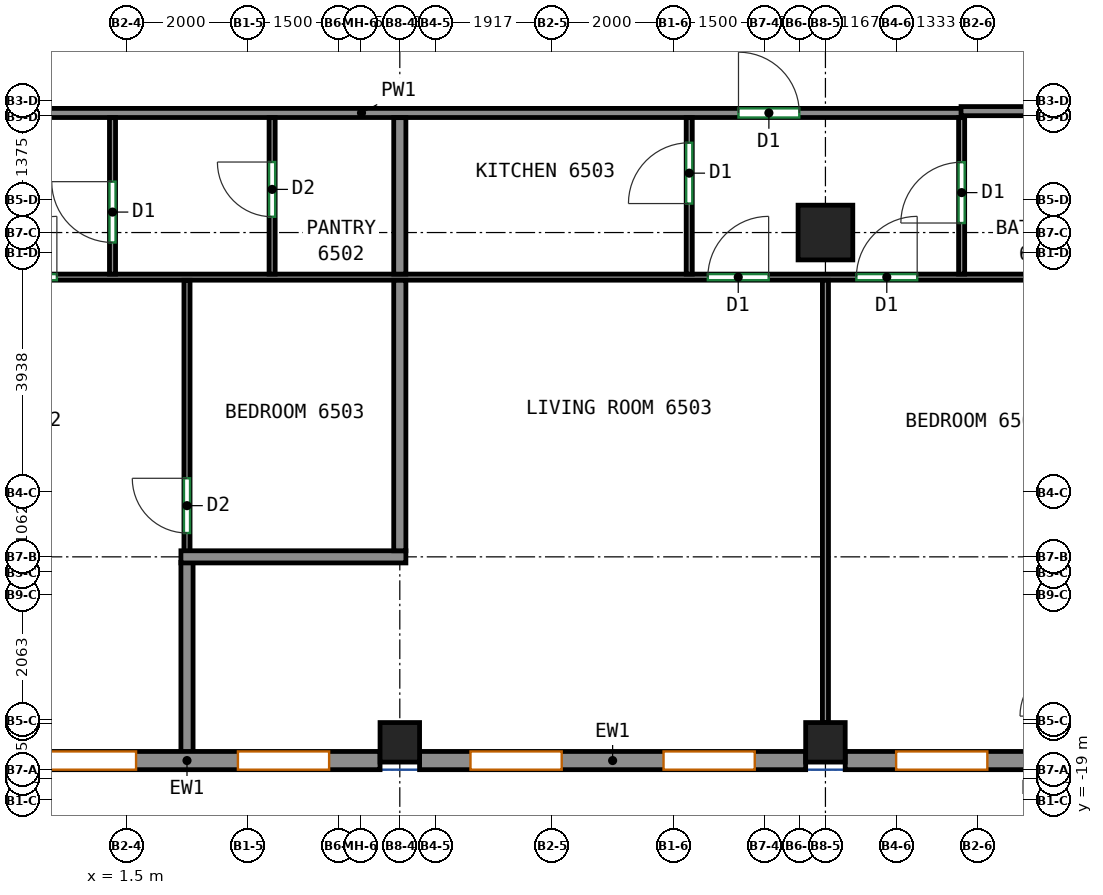
"""IFC4 building model, lengths in metres.
Left out: names, types, materials, properties, quantities, classifications, styles, units other than length and angle.
Written with IfcOpenShell. Run it as: python <this file> out.ifc"""

import sys

from ifc_helpers import new_model, si_unit, direction, frame, frame_2d, origin, origin_2d, place, context, subcontext, project, spatial, rectangle, extrude, source, transform, mapped, element, fill, save


model = new_model("IFC4")
c1 = context("Model", 3, precision=1e-05, world=origin(), true_north=direction((0.0, 1.0)))
c2 = subcontext(c1, "Body", "Model", "MODEL_VIEW")
j1 = project(units=[si_unit("LENGTHUNIT", "METRE"), si_unit("PLANEANGLEUNIT", "RADIAN")], contexts=[c1])
p1 = place(None, origin())
s1 = spatial("IfcSite", under=j1, at=p1, CompositionType="ELEMENT")
p2 = place(p1, origin())
s2 = spatial("IfcBuilding", under=s1, at=p2, CompositionType="ELEMENT")
p3 = place(p2, frame((0.0, 0.0, 267.0)))
s3 = spatial("IfcBuildingStorey", under=s2, at=p3, CompositionType="ELEMENT", Elevation=267.0)
m1 = source(origin(), c2, "Body", "SweptSolid", [
    extrude(rectangle(XDim=0.65, YDim=0.65, at=origin_2d()), origin(), (0.0, 0.0, 1.0), 3.12),
])
for number, where, z_axis, x_axis in (
    (1, (6.0, -18.05, 0.0), (0.0, 0.0, 1.0), (1.0, 0.0, 0.0)),
    (2, (13.0, -18.05, 0.0), (0.0, 0.0, 1.0), (1.0, 0.0, 0.0)),
):
    element("IfcColumn", number, at=place(p3, frame(where, z_axis=z_axis, x_axis=x_axis)), inside=s3, PredefinedType="COLUMN", context=c2, shape_type="MappedRepresentation", body=[
        mapped(m1, transform((0.0, 0.0, 0.0))),
    ])
m2 = source(origin(), c2, "Body", "SweptSolid", [
    extrude(rectangle(XDim=0.9, YDim=0.9, at=origin_2d()), origin(), (0.0, 0.0, 1.0), 3.12),
])
p4 = place(p3, frame((13.0, -9.667, 0.0), z_axis=(0.0, 0.0, 1.0), x_axis=(1.0, 0.0, 0.0)))
e3 = element("IfcColumn", 3, at=p4, inside=s3, PredefinedType="COLUMN", context=c2, shape_type="MappedRepresentation", body=[
    mapped(m2, transform((0.0, 0.0, 0.0))),
])
m3 = source(origin(), c2, "Body", "SweptSolid", [
    extrude(rectangle(XDim=6.35, YDim=0.3, at=frame_2d((3.175, 0.0))), origin(), (0.0, 0.0, 1.0), 3.12),
])
p5 = place(p3, frame((-0.675, -18.35, 0.0), z_axis=(0.0, 0.0, 1.0), x_axis=(1.0, 0.0, 0.0)))
e4 = element("IfcWall", 4, at=p5, inside=s3, PredefinedType="SOLIDWALL", context=c2, shape_type="MappedRepresentation", body=[
    mapped(m3, transform((0.0, 0.0, 0.0))),
])
p6 = place(p5, frame((0.837, 0.0, 0.8)))
e5 = element("IfcOpeningElement", 5, at=p6, cuts=e4, PredefinedType="OPENING", context=c2, shape_type="SweptSolid", body=[
    extrude(rectangle(XDim=1.5, YDim=2.05, at=frame_2d((0.75, 1.025))), frame((0.0, 0.16, 0.0), z_axis=(0.0, -1.0, 0.0), x_axis=(1.0, 0.0, 0.0)), (0.0, 0.0, 1.0), 0.32),
])
p7 = place(p5, frame((4.012, 0.0, 0.8)))
e6 = element("IfcOpeningElement", 6, at=p7, cuts=e4, PredefinedType="OPENING", context=c2, shape_type="SweptSolid", body=[
    extrude(rectangle(XDim=1.5, YDim=2.05, at=frame_2d((0.75, 1.025))), frame((0.0, 0.16, 0.0), z_axis=(0.0, -1.0, 0.0), x_axis=(1.0, 0.0, 0.0)), (0.0, 0.0, 1.0), 0.32),
])
p8 = place(p3, frame((6.325, -18.35, 0.0), z_axis=(0.0, 0.0, 1.0), x_axis=(1.0, 0.0, 0.0)))
e7 = element("IfcWall", 7, at=p8, inside=s3, PredefinedType="SOLIDWALL", context=c2, shape_type="MappedRepresentation", body=[
    mapped(m3, transform((0.0, 0.0, 0.0))),
])
p9 = place(p8, frame((0.837, 0.0, 0.8)))
e8 = element("IfcOpeningElement", 8, at=p9, cuts=e7, PredefinedType="OPENING", context=c2, shape_type="SweptSolid", body=[
    extrude(rectangle(XDim=1.5, YDim=2.05, at=frame_2d((0.75, 1.025))), frame((0.0, 0.16, 0.0), z_axis=(0.0, -1.0, 0.0), x_axis=(1.0, 0.0, 0.0)), (0.0, 0.0, 1.0), 0.32),
])
p10 = place(p8, frame((4.012, 0.0, 0.8)))
e9 = element("IfcOpeningElement", 9, at=p10, cuts=e7, PredefinedType="OPENING", context=c2, shape_type="SweptSolid", body=[
    extrude(rectangle(XDim=1.5, YDim=2.05, at=frame_2d((0.75, 1.025))), frame((0.0, 0.16, 0.0), z_axis=(0.0, -1.0, 0.0), x_axis=(1.0, 0.0, 0.0)), (0.0, 0.0, 1.0), 0.32),
])
p11 = place(p3, frame((13.325, -18.35, 0.0), z_axis=(0.0, 0.0, 1.0), x_axis=(1.0, 0.0, 0.0)))
e10 = element("IfcWall", 10, at=p11, inside=s3, PredefinedType="SOLIDWALL", context=c2, shape_type="MappedRepresentation", body=[
    mapped(m3, transform((0.0, 0.0, 0.0))),
])
p12 = place(p11, frame((0.837, 0.0, 0.8)))
e11 = element("IfcOpeningElement", 11, at=p12, cuts=e10, PredefinedType="OPENING", context=c2, shape_type="SweptSolid", body=[
    extrude(rectangle(XDim=1.5, YDim=2.05, at=frame_2d((0.75, 1.025))), frame((0.0, 0.16, 0.0), z_axis=(0.0, -1.0, 0.0), x_axis=(1.0, 0.0, 0.0)), (0.0, 0.0, 1.0), 0.32),
])
p13 = place(p11, frame((4.012, 0.0, 0.8)))
e12 = element("IfcOpeningElement", 12, at=p13, cuts=e10, PredefinedType="OPENING", context=c2, shape_type="SweptSolid", body=[
    extrude(rectangle(XDim=1.5, YDim=2.05, at=frame_2d((0.75, 1.025))), frame((0.0, 0.16, 0.0), z_axis=(0.0, -1.0, 0.0), x_axis=(1.0, 0.0, 0.0)), (0.0, 0.0, 1.0), 0.32),
])
p14 = place(p3, frame((-4.51, -7.7, 0.0), z_axis=(0.0, 0.0, 1.0), x_axis=(1.0, 0.0, 0.0)))
e13 = element("IfcWall", 13, at=p14, inside=s3, PredefinedType="PARTITIONING", context=c2, shape_type="SweptSolid", body=[
    extrude(rectangle(XDim=19.76, YDim=0.15, at=frame_2d((9.88, 0.0))), origin(), (0.0, 0.0, 1.0), 3.12),
])
p15 = place(p14, frame((3.566, 0.0, 0.0)))
e14 = element("IfcOpeningElement", 14, at=p15, cuts=e13, PredefinedType="OPENING", context=c2, shape_type="SweptSolid", body=[
    extrude(rectangle(XDim=1.0, YDim=2.1, at=frame_2d((0.5, 1.05))), frame((0.0, 0.085, 0.0), z_axis=(0.0, -1.0, 0.0), x_axis=(1.0, 0.0, 0.0)), (0.0, 0.0, 1.0), 0.17),
])
p16 = place(p14, frame((16.08, 0.0, 0.0)))
e15 = element("IfcOpeningElement", 15, at=p16, cuts=e13, PredefinedType="OPENING", context=c2, shape_type="SweptSolid", body=[
    extrude(rectangle(XDim=1.0, YDim=2.1, at=frame_2d((0.5, 1.05))), frame((0.0, 0.085, 0.0), z_axis=(0.0, -1.0, 0.0), x_axis=(1.0, 0.0, 0.0)), (0.0, 0.0, 1.0), 0.17),
])
p17 = place(p3, frame((15.23, -7.67, 0.0), z_axis=(0.0, 0.0, 1.0), x_axis=(1.0, 0.0, 0.0)))
e16 = element("IfcWall", 16, at=p17, inside=s3, PredefinedType="PARTITIONING", context=c2, shape_type="SweptSolid", body=[
    extrude(rectangle(XDim=3.87, YDim=0.15, at=frame_2d((1.935, 0.0))), origin(), (0.0, 0.0, 1.0), 3.12),
])
p18 = place(p3, frame((-4.6, -10.4, 0.0), z_axis=(0.0, 0.0, 1.0), x_axis=(1.0, 0.0, 0.0)))
e17 = element("IfcWall", 17, at=p18, inside=s3, PredefinedType="PARTITIONING", context=c2, shape_type="SweptSolid", body=[
    extrude(rectangle(XDim=22.35, YDim=0.1, at=frame_2d((11.175, 0.0))), origin(), (0.0, 0.0, 1.0), 3.12),
])
p19 = place(p18, frame((3.96, 0.0, 0.0)))
e18 = element("IfcOpeningElement", 18, at=p19, cuts=e17, PredefinedType="OPENING", context=c2, shape_type="SweptSolid", body=[
    extrude(rectangle(XDim=1.0, YDim=2.1, at=frame_2d((0.5, 1.05))), frame((0.0, 0.06, 0.0), z_axis=(0.0, -1.0, 0.0), x_axis=(1.0, 0.0, 0.0)), (0.0, 0.0, 1.0), 0.12),
])
p20 = place(p18, frame((15.666, 0.0, 0.0)))
e19 = element("IfcOpeningElement", 19, at=p20, cuts=e17, PredefinedType="OPENING", context=c2, shape_type="SweptSolid", body=[
    extrude(rectangle(XDim=1.0, YDim=2.1, at=frame_2d((0.5, 1.05))), frame((0.0, 0.06, 0.0), z_axis=(0.0, -1.0, 0.0), x_axis=(1.0, 0.0, 0.0)), (0.0, 0.0, 1.0), 0.12),
])
p21 = place(p18, frame((18.109, 0.0, 0.0)))
e20 = element("IfcOpeningElement", 20, at=p21, cuts=e17, PredefinedType="OPENING", context=c2, shape_type="SweptSolid", body=[
    extrude(rectangle(XDim=1.0, YDim=2.1, at=frame_2d((0.5, 1.05))), frame((0.0, 0.06, 0.0), z_axis=(0.0, -1.0, 0.0), x_axis=(1.0, 0.0, 0.0)), (0.0, 0.0, 1.0), 0.12),
])
p22 = place(p3, frame((1.275, -10.35, 0.0), z_axis=(0.0, 0.0, 1.0), x_axis=(0.0, 1.0, 0.0)))
e21 = element("IfcWall", 21, at=p22, inside=s3, PredefinedType="PARTITIONING", context=c2, shape_type="SweptSolid", body=[
    extrude(rectangle(XDim=2.573, YDim=0.1, at=frame_2d((1.287, 0.0))), origin(), (0.0, 0.0, 1.0), 3.12),
])
p23 = place(p22, frame((0.52, 0.0, 0.0)))
e22 = element("IfcOpeningElement", 22, at=p23, cuts=e21, PredefinedType="OPENING", context=c2, shape_type="SweptSolid", body=[
    extrude(rectangle(XDim=1.0, YDim=2.1, at=frame_2d((0.5, 1.05))), frame((0.0, 0.06, 0.0), z_axis=(0.0, -1.0, 0.0), x_axis=(1.0, 0.0, 0.0)), (0.0, 0.0, 1.0), 0.12),
])
p24 = place(p3, frame((3.9, -10.35, 0.0), z_axis=(0.0, 0.0, 1.0), x_axis=(0.0, 1.0, 0.0)))
e23 = element("IfcWall", 23, at=p24, inside=s3, PredefinedType="PARTITIONING", context=c2, shape_type="SweptSolid", body=[
    extrude(rectangle(XDim=2.573, YDim=0.1, at=frame_2d((1.287, 0.0))), origin(), (0.0, 0.0, 1.0), 3.12),
])
p25 = place(p24, frame((0.943, 0.0, 0.0)))
e24 = element("IfcOpeningElement", 24, at=p25, cuts=e23, PredefinedType="OPENING", context=c2, shape_type="SweptSolid", body=[
    extrude(rectangle(XDim=0.9, YDim=2.1, at=frame_2d((0.45, 1.05))), frame((0.0, 0.06, 0.0), z_axis=(0.0, -1.0, 0.0), x_axis=(1.0, 0.0, 0.0)), (0.0, 0.0, 1.0), 0.12),
])
p26 = place(p3, frame((6.0, -10.35, 0.0), z_axis=(0.0, 0.0, 1.0), x_axis=(0.0, 1.0, 0.0)))
e25 = element("IfcWall", 25, at=p26, inside=s3, PredefinedType="PARTITIONING", context=c2, shape_type="SweptSolid", body=[
    extrude(rectangle(XDim=2.573, YDim=0.2, at=frame_2d((1.287, 0.0))), origin(), (0.0, 0.0, 1.0), 3.12),
])
p27 = place(p3, frame((2.5, -14.91, 0.0), z_axis=(0.0, 0.0, 1.0), x_axis=(0.0, 1.0, 0.0)))
e26 = element("IfcWall", 26, at=p27, inside=s3, PredefinedType="PARTITIONING", context=c2, shape_type="SweptSolid", body=[
    extrude(rectangle(XDim=4.458, YDim=0.1, at=frame_2d((2.229, 0.0))), origin(), (0.0, 0.0, 1.0), 3.12),
])
p28 = place(p27, frame((0.302, 0.0, 0.0)))
e27 = element("IfcOpeningElement", 27, at=p28, cuts=e26, PredefinedType="OPENING", context=c2, shape_type="SweptSolid", body=[
    extrude(rectangle(XDim=0.9, YDim=2.1, at=frame_2d((0.45, 1.05))), frame((0.0, 0.06, 0.0), z_axis=(0.0, -1.0, 0.0), x_axis=(1.0, 0.0, 0.0)), (0.0, 0.0, 1.0), 0.12),
])
p29 = place(p3, frame((2.5, -18.25, 0.0), z_axis=(0.0, 0.0, 1.0), x_axis=(0.0, 1.0, 0.0)))
e28 = element("IfcWall", 28, at=p29, inside=s3, PredefinedType="PARTITIONING", context=c2, shape_type="SweptSolid", body=[
    extrude(rectangle(XDim=3.16, YDim=0.2, at=frame_2d((1.58, 0.0))), origin(), (0.0, 0.0, 1.0), 3.12),
])
p30 = place(p3, frame((2.4, -15.0, 0.0), z_axis=(0.0, 0.0, 1.0), x_axis=(1.0, 0.0, 0.0)))
e29 = element("IfcWall", 29, at=p30, inside=s3, PredefinedType="PARTITIONING", context=c2, shape_type="SweptSolid", body=[
    extrude(rectangle(XDim=3.7, YDim=0.2, at=frame_2d((1.85, 0.0))), origin(), (0.0, 0.0, 1.0), 3.12),
])
p31 = place(p3, frame((6.0, -14.9, 0.0), z_axis=(0.0, 0.0, 1.0), x_axis=(0.0, 1.0, 0.0)))
e30 = element("IfcWall", 30, at=p31, inside=s3, PredefinedType="PARTITIONING", context=c2, shape_type="SweptSolid", body=[
    extrude(rectangle(XDim=4.448, YDim=0.2, at=frame_2d((2.224, 0.0))), origin(), (0.0, 0.0, 1.0), 3.12),
])
p32 = place(p3, frame((10.76, -10.35, 0.0), z_axis=(0.0, 0.0, 1.0), x_axis=(0.0, 1.0, 0.0)))
e31 = element("IfcWall", 31, at=p32, inside=s3, PredefinedType="PARTITIONING", context=c2, shape_type="SweptSolid", body=[
    extrude(rectangle(XDim=2.573, YDim=0.1, at=frame_2d((1.287, 0.0))), origin(), (0.0, 0.0, 1.0), 3.12),
])
p33 = place(p32, frame((1.16, 0.0, 0.0)))
e32 = element("IfcOpeningElement", 32, at=p33, cuts=e31, PredefinedType="OPENING", context=c2, shape_type="SweptSolid", body=[
    extrude(rectangle(XDim=1.0, YDim=2.1, at=frame_2d((0.5, 1.05))), frame((0.0, 0.06, 0.0), z_axis=(0.0, -1.0, 0.0), x_axis=(1.0, 0.0, 0.0)), (0.0, 0.0, 1.0), 0.12),
])
p34 = place(p3, frame((15.24, -10.35, 0.0), z_axis=(0.0, 0.0, 1.0), x_axis=(0.0, 1.0, 0.0)))
e33 = element("IfcWall", 33, at=p34, inside=s3, PredefinedType="PARTITIONING", context=c2, shape_type="SweptSolid", body=[
    extrude(rectangle(XDim=2.573, YDim=0.1, at=frame_2d((1.287, 0.0))), origin(), (0.0, 0.0, 1.0), 3.12),
])
p35 = place(p34, frame((0.84, 0.0, 0.0)))
e34 = element("IfcOpeningElement", 34, at=p35, cuts=e33, PredefinedType="OPENING", context=c2, shape_type="SweptSolid", body=[
    extrude(rectangle(XDim=1.0, YDim=2.1, at=frame_2d((0.5, 1.05))), frame((0.0, 0.06, 0.0), z_axis=(0.0, -1.0, 0.0), x_axis=(1.0, 0.0, 0.0)), (0.0, 0.0, 1.0), 0.12),
])
p36 = place(p3, frame((13.0, -17.725, 0.0), z_axis=(0.0, 0.0, 1.0), x_axis=(0.0, 1.0, 0.0)))
e35 = element("IfcWall", 35, at=p36, inside=s3, PredefinedType="PARTITIONING", context=c2, shape_type="SweptSolid", body=[
    extrude(rectangle(XDim=7.273, YDim=0.1, at=frame_2d((3.637, 0.0))), origin(), (0.0, 0.0, 1.0), 3.12),
])
p37 = place(p6, origin())
e36 = element("IfcWindow", 36, at=p37, inside=s3, PartitioningType="SINGLE_PANEL", PredefinedType="WINDOW", context=c2, shape_type="SweptSolid", body=[
    extrude(rectangle(XDim=1.5, YDim=2.05, at=frame_2d((0.75, 1.025))), frame((0.0, 0.03, 0.0), z_axis=(0.0, -1.0, 0.0), x_axis=(1.0, 0.0, 0.0)), (0.0, 0.0, 1.0), 0.06),
])
fill(e5, e36)
p38 = place(p7, origin())
e37 = element("IfcWindow", 37, at=p38, inside=s3, PartitioningType="SINGLE_PANEL", PredefinedType="WINDOW", context=c2, shape_type="SweptSolid", body=[
    extrude(rectangle(XDim=1.5, YDim=2.05, at=frame_2d((0.75, 1.025))), frame((0.0, 0.03, 0.0), z_axis=(0.0, -1.0, 0.0), x_axis=(1.0, 0.0, 0.0)), (0.0, 0.0, 1.0), 0.06),
])
fill(e6, e37)
p39 = place(p9, origin())
e38 = element("IfcWindow", 38, at=p39, inside=s3, PartitioningType="SINGLE_PANEL", PredefinedType="WINDOW", context=c2, shape_type="SweptSolid", body=[
    extrude(rectangle(XDim=1.5, YDim=2.05, at=frame_2d((0.75, 1.025))), frame((0.0, 0.03, 0.0), z_axis=(0.0, -1.0, 0.0), x_axis=(1.0, 0.0, 0.0)), (0.0, 0.0, 1.0), 0.06),
])
fill(e8, e38)
p40 = place(p10, origin())
e39 = element("IfcWindow", 39, at=p40, inside=s3, PartitioningType="SINGLE_PANEL", PredefinedType="WINDOW", context=c2, shape_type="SweptSolid", body=[
    extrude(rectangle(XDim=1.5, YDim=2.05, at=frame_2d((0.75, 1.025))), frame((0.0, 0.03, 0.0), z_axis=(0.0, -1.0, 0.0), x_axis=(1.0, 0.0, 0.0)), (0.0, 0.0, 1.0), 0.06),
])
fill(e9, e39)
p41 = place(p12, origin())
e40 = element("IfcWindow", 40, at=p41, inside=s3, PartitioningType="SINGLE_PANEL", PredefinedType="WINDOW", context=c2, shape_type="SweptSolid", body=[
    extrude(rectangle(XDim=1.5, YDim=2.05, at=frame_2d((0.75, 1.025))), frame((0.0, 0.03, 0.0), z_axis=(0.0, -1.0, 0.0), x_axis=(1.0, 0.0, 0.0)), (0.0, 0.0, 1.0), 0.06),
])
fill(e11, e40)
p42 = place(p28, origin())
e41 = element("IfcDoor", 41, at=p42, inside=s3, OperationType="SINGLE_SWING_RIGHT", PredefinedType="DOOR", context=c2, shape_type="SweptSolid", body=[
    extrude(rectangle(XDim=0.9, YDim=2.1, at=frame_2d((0.45, 1.05))), frame((0.0, 0.025, 0.0), z_axis=(0.0, -1.0, 0.0), x_axis=(1.0, 0.0, 0.0)), (0.0, 0.0, 1.0), 0.05),
])
fill(e27, e41)
p43 = place(p19, origin())
e42 = element("IfcDoor", 42, at=p43, inside=s3, OperationType="SINGLE_SWING_RIGHT", PredefinedType="DOOR", context=c2, shape_type="SweptSolid", body=[
    extrude(rectangle(XDim=1.0, YDim=2.1, at=frame_2d((0.5, 1.05))), frame((0.0, 0.025, 0.0), z_axis=(0.0, -1.0, 0.0), x_axis=(1.0, 0.0, 0.0)), (0.0, 0.0, 1.0), 0.05),
])
fill(e18, e42)
p44 = place(p20, origin())
e43 = element("IfcDoor", 43, at=p44, inside=s3, OperationType="SINGLE_SWING_RIGHT", PredefinedType="DOOR", context=c2, shape_type="SweptSolid", body=[
    extrude(rectangle(XDim=1.0, YDim=2.1, at=frame_2d((0.5, 1.05))), frame((0.0, 0.025, 0.0), z_axis=(0.0, -1.0, 0.0), x_axis=(1.0, 0.0, 0.0)), (0.0, 0.0, 1.0), 0.05),
])
fill(e19, e43)
p45 = place(p21, origin())
e44 = element("IfcDoor", 44, at=p45, inside=s3, OperationType="SINGLE_SWING_RIGHT", PredefinedType="DOOR", context=c2, shape_type="SweptSolid", body=[
    extrude(rectangle(XDim=1.0, YDim=2.1, at=frame_2d((0.5, 1.05))), frame((0.0, 0.025, 0.0), z_axis=(0.0, -1.0, 0.0), x_axis=(1.0, 0.0, 0.0)), (0.0, 0.0, 1.0), 0.05),
])
fill(e20, e44)
p46 = place(p23, origin())
e45 = element("IfcDoor", 45, at=p46, inside=s3, OperationType="SINGLE_SWING_RIGHT", PredefinedType="DOOR", context=c2, shape_type="SweptSolid", body=[
    extrude(rectangle(XDim=1.0, YDim=2.1, at=frame_2d((0.5, 1.05))), frame((0.0, 0.025, 0.0), z_axis=(0.0, -1.0, 0.0), x_axis=(1.0, 0.0, 0.0)), (0.0, 0.0, 1.0), 0.05),
])
fill(e22, e45)
p47 = place(p35, origin())
e46 = element("IfcDoor", 46, at=p47, inside=s3, OperationType="SINGLE_SWING_LEFT", PredefinedType="DOOR", context=c2, shape_type="SweptSolid", body=[
    extrude(rectangle(XDim=1.0, YDim=2.1, at=frame_2d((0.5, 1.05))), frame((0.0, 0.025, 0.0), z_axis=(0.0, -1.0, 0.0), x_axis=(1.0, 0.0, 0.0)), (0.0, 0.0, 1.0), 0.05),
])
fill(e34, e46)
p48 = place(p25, origin())
e47 = element("IfcDoor", 47, at=p48, inside=s3, OperationType="SINGLE_SWING_RIGHT", PredefinedType="DOOR", context=c2, shape_type="SweptSolid", body=[
    extrude(rectangle(XDim=0.9, YDim=2.1, at=frame_2d((0.45, 1.05))), frame((0.0, 0.025, 0.0), z_axis=(0.0, -1.0, 0.0), x_axis=(1.0, 0.0, 0.0)), (0.0, 0.0, 1.0), 0.05),
])
fill(e24, e47)
p49 = place(p33, origin())
e48 = element("IfcDoor", 48, at=p49, inside=s3, OperationType="SINGLE_SWING_LEFT", PredefinedType="DOOR", context=c2, shape_type="SweptSolid", body=[
    extrude(rectangle(XDim=1.0, YDim=2.1, at=frame_2d((0.5, 1.05))), frame((0.0, 0.025, 0.0), z_axis=(0.0, -1.0, 0.0), x_axis=(1.0, 0.0, 0.0)), (0.0, 0.0, 1.0), 0.05),
])
fill(e32, e48)
p50 = place(p16, origin())
e49 = element("IfcDoor", 49, at=p50, inside=s3, OperationType="SINGLE_SWING_LEFT", PredefinedType="DOOR", context=c2, shape_type="SweptSolid", body=[
    extrude(rectangle(XDim=1.0, YDim=2.1, at=frame_2d((0.5, 1.05))), frame((0.0, 0.025, 0.0), z_axis=(0.0, -1.0, 0.0), x_axis=(1.0, 0.0, 0.0)), (0.0, 0.0, 1.0), 0.05),
])
fill(e15, e49)
save(model, sys.argv[1])
